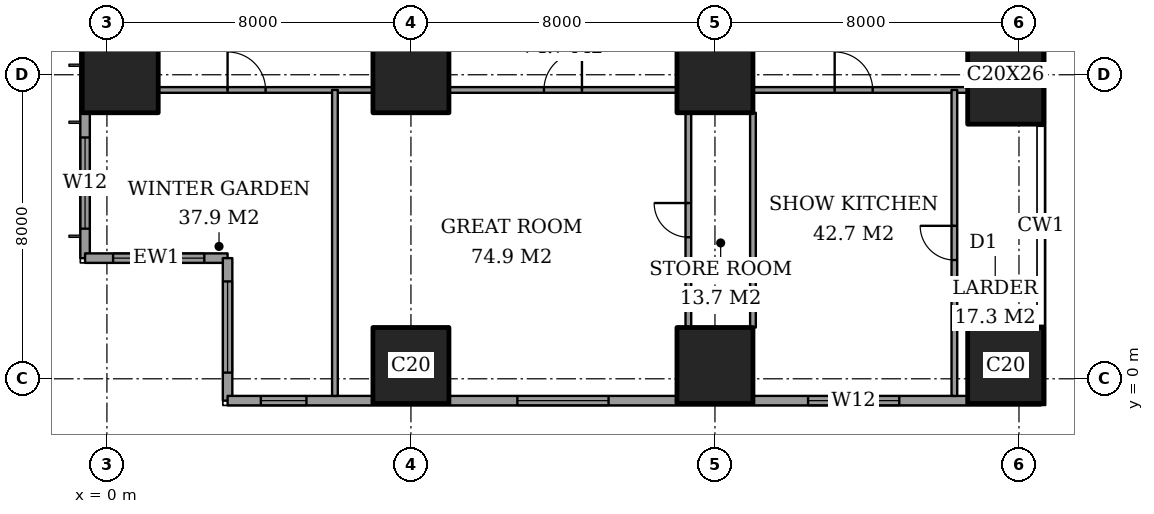
"""IFC4 building model, lengths in metres.
Left out: names, types, materials, properties, quantities, classifications, styles, units other than length and angle.
Written with IfcOpenShell. Run it as: python <this file> out.ifc"""

import sys

from ifc_helpers import new_model, si_unit, direction, frame, frame_2d, origin, origin_2d, place, context, subcontext, project, spatial, rectangle, extrude, element, fill, save


model = new_model("IFC4")
c1 = context("Model", 3, precision=1e-05, world=origin(), true_north=direction((0.0, 1.0)))
c2 = subcontext(c1, "Body", "Model", "MODEL_VIEW")
j1 = project(units=[si_unit("LENGTHUNIT", "METRE"), si_unit("PLANEANGLEUNIT", "RADIAN")], contexts=[c1])
p1 = place(None, origin())
s1 = spatial("IfcSite", under=j1, at=p1, CompositionType="ELEMENT")
p2 = place(p1, origin())
s2 = spatial("IfcBuilding", under=s1, at=p2, CompositionType="ELEMENT")
p3 = place(p2, frame((0.0, 0.0, 107.0)))
s3 = spatial("IfcBuildingStorey", under=s2, at=p3, CompositionType="ELEMENT", Elevation=107.0)
for number, where, z_axis, x_axis in (
    (1, (0.35, 8.0, 0.0), (0.0, 0.0, 1.0), (1.0, 0.0, 0.0)),
    (2, (8.0, 0.35, 0.0), (0.0, 0.0, 1.0), (1.0, 0.0, 0.0)),
    (3, (8.0, 8.0, 0.0), (0.0, 0.0, 1.0), (1.0, 0.0, 0.0)),
    (4, (16.0, 0.35, 0.0), (0.0, 0.0, 1.0), (1.0, 0.0, 0.0)),
    (5, (16.0, 8.0, 0.0), (0.0, 0.0, 1.0), (1.0, 0.0, 0.0)),
    (6, (23.65, 0.35, 0.0), (0.0, 0.0, 1.0), (1.0, 0.0, 0.0)),
):
    element("IfcColumn", number, at=place(p3, frame(where, z_axis=z_axis, x_axis=x_axis)), inside=s3, PredefinedType="COLUMN", context=c2, shape_type="SweptSolid", body=[
        extrude(rectangle(XDim=2.0, YDim=2.0, at=origin_2d()), origin(), (0.0, 0.0, 1.0), 3.6),
    ])
p4 = place(p3, frame((23.65, 8.0, 0.0), z_axis=(0.0, 0.0, 1.0), x_axis=(1.0, 0.0, 0.0)))
e7 = element("IfcColumn", 7, at=p4, inside=s3, PredefinedType="COLUMN", context=c2, shape_type="SweptSolid", body=[
    extrude(rectangle(XDim=2.0, YDim=2.6, at=origin_2d()), origin(), (0.0, 0.0, 1.0), 3.6),
])
p5 = place(p3, frame((-0.575, 44.825, 0.0), z_axis=(0.0, 0.0, 1.0), x_axis=(0.0, -1.0, 0.0)))
e8 = element("IfcWall", 8, at=p5, inside=s3, PredefinedType="SOLIDWALL", context=c2, shape_type="SweptSolid", body=[
    extrude(rectangle(XDim=41.65, YDim=0.25, at=frame_2d((20.825, 0.0))), origin(), (0.0, 0.0, 1.0), 3.6),
])
p6 = place(p5, frame((0.775, 0.0, 0.4)))
e9 = element("IfcOpeningElement", 9, at=p6, cuts=e8, PredefinedType="OPENING", context=c2, shape_type="SweptSolid", body=[
    extrude(rectangle(XDim=2.4, YDim=2.2, at=frame_2d((1.2, 1.1))), frame((0.0, 0.135, 0.0), z_axis=(0.0, -1.0, 0.0), x_axis=(1.0, 0.0, 0.0)), (0.0, 0.0, 1.0), 0.27),
])
p7 = place(p5, frame((6.2, 0.0, 0.4)))
e10 = element("IfcOpeningElement", 10, at=p7, cuts=e8, PredefinedType="OPENING", context=c2, shape_type="SweptSolid", body=[
    extrude(rectangle(XDim=1.2, YDim=2.2, at=frame_2d((0.6, 1.1))), frame((0.0, 0.135, 0.0), z_axis=(0.0, -1.0, 0.0), x_axis=(1.0, 0.0, 0.0)), (0.0, 0.0, 1.0), 0.27),
])
p8 = place(p5, frame((8.525, 0.0, 0.4)))
e11 = element("IfcOpeningElement", 11, at=p8, cuts=e8, PredefinedType="OPENING", context=c2, shape_type="SweptSolid", body=[
    extrude(rectangle(XDim=2.4, YDim=2.2, at=frame_2d((1.2, 1.1))), frame((0.0, 0.135, 0.0), z_axis=(0.0, -1.0, 0.0), x_axis=(1.0, 0.0, 0.0)), (0.0, 0.0, 1.0), 0.27),
])
p9 = place(p5, frame((15.625, 0.0, 0.4)))
e12 = element("IfcOpeningElement", 12, at=p9, cuts=e8, PredefinedType="OPENING", context=c2, shape_type="SweptSolid", body=[
    extrude(rectangle(XDim=2.4, YDim=2.2, at=frame_2d((1.2, 1.1))), frame((0.0, 0.135, 0.0), z_axis=(0.0, -1.0, 0.0), x_axis=(1.0, 0.0, 0.0)), (0.0, 0.0, 1.0), 0.27),
])
p10 = place(p5, frame((23.625, 0.0, 0.4)))
e13 = element("IfcOpeningElement", 13, at=p10, cuts=e8, PredefinedType="OPENING", context=c2, shape_type="SweptSolid", body=[
    extrude(rectangle(XDim=2.4, YDim=2.2, at=frame_2d((1.2, 1.1))), frame((0.0, 0.135, 0.0), z_axis=(0.0, -1.0, 0.0), x_axis=(1.0, 0.0, 0.0)), (0.0, 0.0, 1.0), 0.27),
])
p11 = place(p5, frame((30.825, 0.0, 0.4)))
e14 = element("IfcOpeningElement", 14, at=p11, cuts=e8, PredefinedType="OPENING", context=c2, shape_type="SweptSolid", body=[
    extrude(rectangle(XDim=2.4, YDim=2.2, at=frame_2d((1.2, 1.1))), frame((0.0, 0.135, 0.0), z_axis=(0.0, -1.0, 0.0), x_axis=(1.0, 0.0, 0.0)), (0.0, 0.0, 1.0), 0.27),
])
p12 = place(p5, frame((34.5, 0.0, 0.4)))
e15 = element("IfcOpeningElement", 15, at=p12, cuts=e8, PredefinedType="OPENING", context=c2, shape_type="SweptSolid", body=[
    extrude(rectangle(XDim=1.2, YDim=2.2, at=frame_2d((0.6, 1.1))), frame((0.0, 0.135, 0.0), z_axis=(0.0, -1.0, 0.0), x_axis=(1.0, 0.0, 0.0)), (0.0, 0.0, 1.0), 0.27),
])
p13 = place(p5, frame((38.475, 0.0, 0.4)))
e16 = element("IfcOpeningElement", 16, at=p13, cuts=e8, PredefinedType="OPENING", context=c2, shape_type="SweptSolid", body=[
    extrude(rectangle(XDim=2.4, YDim=2.2, at=frame_2d((1.2, 1.1))), frame((0.0, 0.135, 0.0), z_axis=(0.0, -1.0, 0.0), x_axis=(1.0, 0.0, 0.0)), (0.0, 0.0, 1.0), 0.27),
])
p14 = place(p3, frame((-0.575, 3.175, 0.0), z_axis=(0.0, 0.0, 1.0), x_axis=(1.0, 0.0, 0.0)))
e17 = element("IfcWall", 17, at=p14, inside=s3, PredefinedType="SOLIDWALL", context=c2, shape_type="SweptSolid", body=[
    extrude(rectangle(XDim=3.75, YDim=0.25, at=frame_2d((1.875, 0.0))), origin(), (0.0, 0.0, 1.0), 3.6),
])
p15 = place(p14, frame((0.738, 0.0, 0.4)))
e18 = element("IfcOpeningElement", 18, at=p15, cuts=e17, PredefinedType="OPENING", context=c2, shape_type="SweptSolid", body=[
    extrude(rectangle(XDim=2.4, YDim=2.2, at=frame_2d((1.2, 1.1))), frame((0.0, 0.135, 0.0), z_axis=(0.0, -1.0, 0.0), x_axis=(1.0, 0.0, 0.0)), (0.0, 0.0, 1.0), 0.27),
])
p16 = place(p3, frame((3.175, 3.175, 0.0), z_axis=(0.0, 0.0, 1.0), x_axis=(0.0, -1.0, 0.0)))
e19 = element("IfcWall", 19, at=p16, inside=s3, PredefinedType="SOLIDWALL", context=c2, shape_type="SweptSolid", body=[
    extrude(rectangle(XDim=3.75, YDim=0.25, at=frame_2d((1.875, 0.0))), origin(), (0.0, 0.0, 1.0), 3.6),
])
p17 = place(p16, frame((0.613, 0.0, 0.4)))
e20 = element("IfcOpeningElement", 20, at=p17, cuts=e19, PredefinedType="OPENING", context=c2, shape_type="SweptSolid", body=[
    extrude(rectangle(XDim=2.4, YDim=2.2, at=frame_2d((1.2, 1.1))), frame((0.0, 0.135, 0.0), z_axis=(0.0, -1.0, 0.0), x_axis=(1.0, 0.0, 0.0)), (0.0, 0.0, 1.0), 0.27),
])
p18 = place(p3, frame((3.175, -0.575, 0.0), z_axis=(0.0, 0.0, 1.0), x_axis=(1.0, 0.0, 0.0)))
e21 = element("IfcWall", 21, at=p18, inside=s3, PredefinedType="SOLIDWALL", context=c2, shape_type="SweptSolid", body=[
    extrude(rectangle(XDim=21.4, YDim=0.25, at=frame_2d((10.7, 0.0))), origin(), (0.0, 0.0, 1.0), 3.6),
])
p19 = place(p18, frame((0.875, 0.0, 0.4)))
e22 = element("IfcOpeningElement", 22, at=p19, cuts=e21, PredefinedType="OPENING", context=c2, shape_type="SweptSolid", body=[
    extrude(rectangle(XDim=1.2, YDim=2.2, at=frame_2d((0.6, 1.1))), frame((0.0, 0.135, 0.0), z_axis=(0.0, -1.0, 0.0), x_axis=(1.0, 0.0, 0.0)), (0.0, 0.0, 1.0), 0.27),
])
p20 = place(p18, frame((7.625, 0.0, 0.4)))
e23 = element("IfcOpeningElement", 23, at=p20, cuts=e21, PredefinedType="OPENING", context=c2, shape_type="SweptSolid", body=[
    extrude(rectangle(XDim=2.4, YDim=2.2, at=frame_2d((1.2, 1.1))), frame((0.0, 0.135, 0.0), z_axis=(0.0, -1.0, 0.0), x_axis=(1.0, 0.0, 0.0)), (0.0, 0.0, 1.0), 0.27),
])
p21 = place(p18, frame((15.275, 0.0, 0.4)))
e24 = element("IfcOpeningElement", 24, at=p21, cuts=e21, PredefinedType="OPENING", context=c2, shape_type="SweptSolid", body=[
    extrude(rectangle(XDim=2.4, YDim=2.2, at=frame_2d((1.2, 1.1))), frame((0.0, 0.135, 0.0), z_axis=(0.0, -1.0, 0.0), x_axis=(1.0, 0.0, 0.0)), (0.0, 0.0, 1.0), 0.27),
])
p22 = place(p3, frame((1.35, 7.6, 0.0), z_axis=(0.0, 0.0, 1.0), x_axis=(1.0, 0.0, 0.0)))
e25 = element("IfcWall", 25, at=p22, inside=s3, PredefinedType="PARTITIONING", context=c2, shape_type="SweptSolid", body=[
    extrude(rectangle(XDim=5.65, YDim=0.15, at=frame_2d((2.825, 0.0))), origin(), (0.0, 0.0, 1.0), 3.35),
])
p23 = place(p22, frame((1.825, 0.0, 0.0)))
e26 = element("IfcOpeningElement", 26, at=p23, cuts=e25, PredefinedType="OPENING", context=c2, shape_type="SweptSolid", body=[
    extrude(rectangle(XDim=1.0, YDim=2.1, at=frame_2d((0.5, 1.05))), frame((0.0, 0.085, 0.0), z_axis=(0.0, -1.0, 0.0), x_axis=(1.0, 0.0, 0.0)), (0.0, 0.0, 1.0), 0.17),
])
p24 = place(p3, frame((9.0, 7.6, 0.0), z_axis=(0.0, 0.0, 1.0), x_axis=(1.0, 0.0, 0.0)))
e27 = element("IfcWall", 27, at=p24, inside=s3, PredefinedType="PARTITIONING", context=c2, shape_type="SweptSolid", body=[
    extrude(rectangle(XDim=6.0, YDim=0.15, at=frame_2d((3.0, 0.0))), origin(), (0.0, 0.0, 1.0), 3.35),
])
p25 = place(p24, frame((2.5, 0.0, 0.0)))
e28 = element("IfcOpeningElement", 28, at=p25, cuts=e27, PredefinedType="OPENING", context=c2, shape_type="SweptSolid", body=[
    extrude(rectangle(XDim=1.0, YDim=2.1, at=frame_2d((0.5, 1.05))), frame((0.0, 0.085, 0.0), z_axis=(0.0, -1.0, 0.0), x_axis=(1.0, 0.0, 0.0)), (0.0, 0.0, 1.0), 0.17),
])
p26 = place(p3, frame((17.0, 7.6, 0.0), z_axis=(0.0, 0.0, 1.0), x_axis=(1.0, 0.0, 0.0)))
e29 = element("IfcWall", 29, at=p26, inside=s3, PredefinedType="PARTITIONING", context=c2, shape_type="SweptSolid", body=[
    extrude(rectangle(XDim=5.65, YDim=0.15, at=frame_2d((2.825, 0.0))), origin(), (0.0, 0.0, 1.0), 3.35),
])
p27 = place(p26, frame((2.15, 0.0, 0.0)))
e30 = element("IfcOpeningElement", 30, at=p27, cuts=e29, PredefinedType="OPENING", context=c2, shape_type="SweptSolid", body=[
    extrude(rectangle(XDim=1.0, YDim=2.1, at=frame_2d((0.5, 1.05))), frame((0.0, 0.085, 0.0), z_axis=(0.0, -1.0, 0.0), x_axis=(1.0, 0.0, 0.0)), (0.0, 0.0, 1.0), 0.17),
])
p28 = place(p3, frame((6.0, -0.45, 0.0), z_axis=(0.0, 0.0, 1.0), x_axis=(0.0, 1.0, 0.0)))
e31 = element("IfcWall", 31, at=p28, inside=s3, PredefinedType="PARTITIONING", context=c2, shape_type="SweptSolid", body=[
    extrude(rectangle(XDim=8.05, YDim=0.15, at=frame_2d((4.025, 0.0))), origin(), (0.0, 0.0, 1.0), 3.35),
])
p29 = place(p3, frame((15.3, 1.35, 0.0), z_axis=(0.0, 0.0, 1.0), x_axis=(0.0, 1.0, 0.0)))
e32 = element("IfcWall", 32, at=p29, inside=s3, PredefinedType="PARTITIONING", context=c2, shape_type="SweptSolid", body=[
    extrude(rectangle(XDim=5.65, YDim=0.15, at=frame_2d((2.825, 0.0))), origin(), (0.0, 0.0, 1.0), 3.35),
])
p30 = place(p29, frame((2.375, 0.0, 0.0)))
e33 = element("IfcOpeningElement", 33, at=p30, cuts=e32, PredefinedType="OPENING", context=c2, shape_type="SweptSolid", body=[
    extrude(rectangle(XDim=0.9, YDim=2.1, at=frame_2d((0.45, 1.05))), frame((0.0, 0.085, 0.0), z_axis=(0.0, -1.0, 0.0), x_axis=(1.0, 0.0, 0.0)), (0.0, 0.0, 1.0), 0.17),
])
p31 = place(p3, frame((17.0, 1.35, 0.0), z_axis=(0.0, 0.0, 1.0), x_axis=(0.0, 1.0, 0.0)))
e34 = element("IfcWall", 34, at=p31, inside=s3, PredefinedType="PARTITIONING", context=c2, shape_type="SweptSolid", body=[
    extrude(rectangle(XDim=5.65, YDim=0.15, at=frame_2d((2.825, 0.0))), origin(), (0.0, 0.0, 1.0), 3.35),
])
p32 = place(p3, frame((22.3, -0.45, 0.0), z_axis=(0.0, 0.0, 1.0), x_axis=(0.0, 1.0, 0.0)))
e35 = element("IfcWall", 35, at=p32, inside=s3, PredefinedType="PARTITIONING", context=c2, shape_type="SweptSolid", body=[
    extrude(rectangle(XDim=8.05, YDim=0.15, at=frame_2d((4.025, 0.0))), origin(), (0.0, 0.0, 1.0), 3.35),
])
p33 = place(p32, frame((3.575, 0.0, 0.0)))
e36 = element("IfcOpeningElement", 36, at=p33, cuts=e35, PredefinedType="OPENING", context=c2, shape_type="SweptSolid", body=[
    extrude(rectangle(XDim=0.9, YDim=2.1, at=frame_2d((0.45, 1.05))), frame((0.0, 0.085, 0.0), z_axis=(0.0, -1.0, 0.0), x_axis=(1.0, 0.0, 0.0)), (0.0, 0.0, 1.0), 0.17),
])
p34 = place(p13, origin())
e37 = element("IfcWindow", 37, at=p34, inside=s3, PartitioningType="SINGLE_PANEL", PredefinedType="WINDOW", context=c2, shape_type="SweptSolid", body=[
    extrude(rectangle(XDim=2.4, YDim=2.2, at=frame_2d((1.2, 1.1))), frame((0.0, 0.03, 0.0), z_axis=(0.0, -1.0, 0.0), x_axis=(1.0, 0.0, 0.0)), (0.0, 0.0, 1.0), 0.06),
])
fill(e16, e37)
p35 = place(p15, origin())
e38 = element("IfcWindow", 38, at=p35, inside=s3, PartitioningType="SINGLE_PANEL", PredefinedType="WINDOW", context=c2, shape_type="SweptSolid", body=[
    extrude(rectangle(XDim=2.4, YDim=2.2, at=frame_2d((1.2, 1.1))), frame((0.0, 0.03, 0.0), z_axis=(0.0, -1.0, 0.0), x_axis=(1.0, 0.0, 0.0)), (0.0, 0.0, 1.0), 0.06),
])
fill(e18, e38)
p36 = place(p17, origin())
e39 = element("IfcWindow", 39, at=p36, inside=s3, PartitioningType="SINGLE_PANEL", PredefinedType="WINDOW", context=c2, shape_type="SweptSolid", body=[
    extrude(rectangle(XDim=2.4, YDim=2.2, at=frame_2d((1.2, 1.1))), frame((0.0, 0.03, 0.0), z_axis=(0.0, -1.0, 0.0), x_axis=(1.0, 0.0, 0.0)), (0.0, 0.0, 1.0), 0.06),
])
fill(e20, e39)
p37 = place(p19, origin())
e40 = element("IfcWindow", 40, at=p37, inside=s3, PartitioningType="SINGLE_PANEL", PredefinedType="WINDOW", context=c2, shape_type="SweptSolid", body=[
    extrude(rectangle(XDim=1.2, YDim=2.2, at=frame_2d((0.6, 1.1))), frame((0.0, 0.03, 0.0), z_axis=(0.0, -1.0, 0.0), x_axis=(1.0, 0.0, 0.0)), (0.0, 0.0, 1.0), 0.06),
])
fill(e22, e40)
p38 = place(p20, origin())
e41 = element("IfcWindow", 41, at=p38, inside=s3, PartitioningType="SINGLE_PANEL", PredefinedType="WINDOW", context=c2, shape_type="SweptSolid", body=[
    extrude(rectangle(XDim=2.4, YDim=2.2, at=frame_2d((1.2, 1.1))), frame((0.0, 0.03, 0.0), z_axis=(0.0, -1.0, 0.0), x_axis=(1.0, 0.0, 0.0)), (0.0, 0.0, 1.0), 0.06),
])
fill(e23, e41)
p39 = place(p21, origin())
e42 = element("IfcWindow", 42, at=p39, inside=s3, PartitioningType="SINGLE_PANEL", PredefinedType="WINDOW", context=c2, shape_type="SweptSolid", body=[
    extrude(rectangle(XDim=2.4, YDim=2.2, at=frame_2d((1.2, 1.1))), frame((0.0, 0.03, 0.0), z_axis=(0.0, -1.0, 0.0), x_axis=(1.0, 0.0, 0.0)), (0.0, 0.0, 1.0), 0.06),
])
fill(e24, e42)
p40 = place(p23, origin())
e43 = element("IfcDoor", 43, at=p40, inside=s3, OperationType="SINGLE_SWING_RIGHT", PredefinedType="DOOR", context=c2, shape_type="SweptSolid", body=[
    extrude(rectangle(XDim=1.0, YDim=2.1, at=frame_2d((0.5, 1.05))), frame((0.0, 0.025, 0.0), z_axis=(0.0, -1.0, 0.0), x_axis=(1.0, 0.0, 0.0)), (0.0, 0.0, 1.0), 0.05),
])
fill(e26, e43)
p41 = place(p25, origin())
e44 = element("IfcDoor", 44, at=p41, inside=s3, OperationType="SINGLE_SWING_LEFT", PredefinedType="DOOR", context=c2, shape_type="SweptSolid", body=[
    extrude(rectangle(XDim=1.0, YDim=2.1, at=frame_2d((0.5, 1.05))), frame((0.0, 0.025, 0.0), z_axis=(0.0, -1.0, 0.0), x_axis=(1.0, 0.0, 0.0)), (0.0, 0.0, 1.0), 0.05),
])
fill(e28, e44)
p42 = place(p30, origin())
e45 = element("IfcDoor", 45, at=p42, inside=s3, OperationType="SINGLE_SWING_LEFT", PredefinedType="DOOR", context=c2, shape_type="SweptSolid", body=[
    extrude(rectangle(XDim=0.9, YDim=2.1, at=frame_2d((0.45, 1.05))), frame((0.0, 0.025, 0.0), z_axis=(0.0, -1.0, 0.0), x_axis=(1.0, 0.0, 0.0)), (0.0, 0.0, 1.0), 0.05),
])
fill(e33, e45)
p43 = place(p27, origin())
e46 = element("IfcDoor", 46, at=p43, inside=s3, OperationType="SINGLE_SWING_RIGHT", PredefinedType="DOOR", context=c2, shape_type="SweptSolid", body=[
    extrude(rectangle(XDim=1.0, YDim=2.1, at=frame_2d((0.5, 1.05))), frame((0.0, 0.025, 0.0), z_axis=(0.0, -1.0, 0.0), x_axis=(1.0, 0.0, 0.0)), (0.0, 0.0, 1.0), 0.05),
])
fill(e30, e46)
p44 = place(p33, origin())
e47 = element("IfcDoor", 47, at=p44, inside=s3, OperationType="SINGLE_SWING_LEFT", PredefinedType="DOOR", context=c2, shape_type="SweptSolid", body=[
    extrude(rectangle(XDim=0.9, YDim=2.1, at=frame_2d((0.45, 1.05))), frame((0.0, 0.025, 0.0), z_axis=(0.0, -1.0, 0.0), x_axis=(1.0, 0.0, 0.0)), (0.0, 0.0, 1.0), 0.05),
])
fill(e36, e47)
save(model, sys.argv[1])
